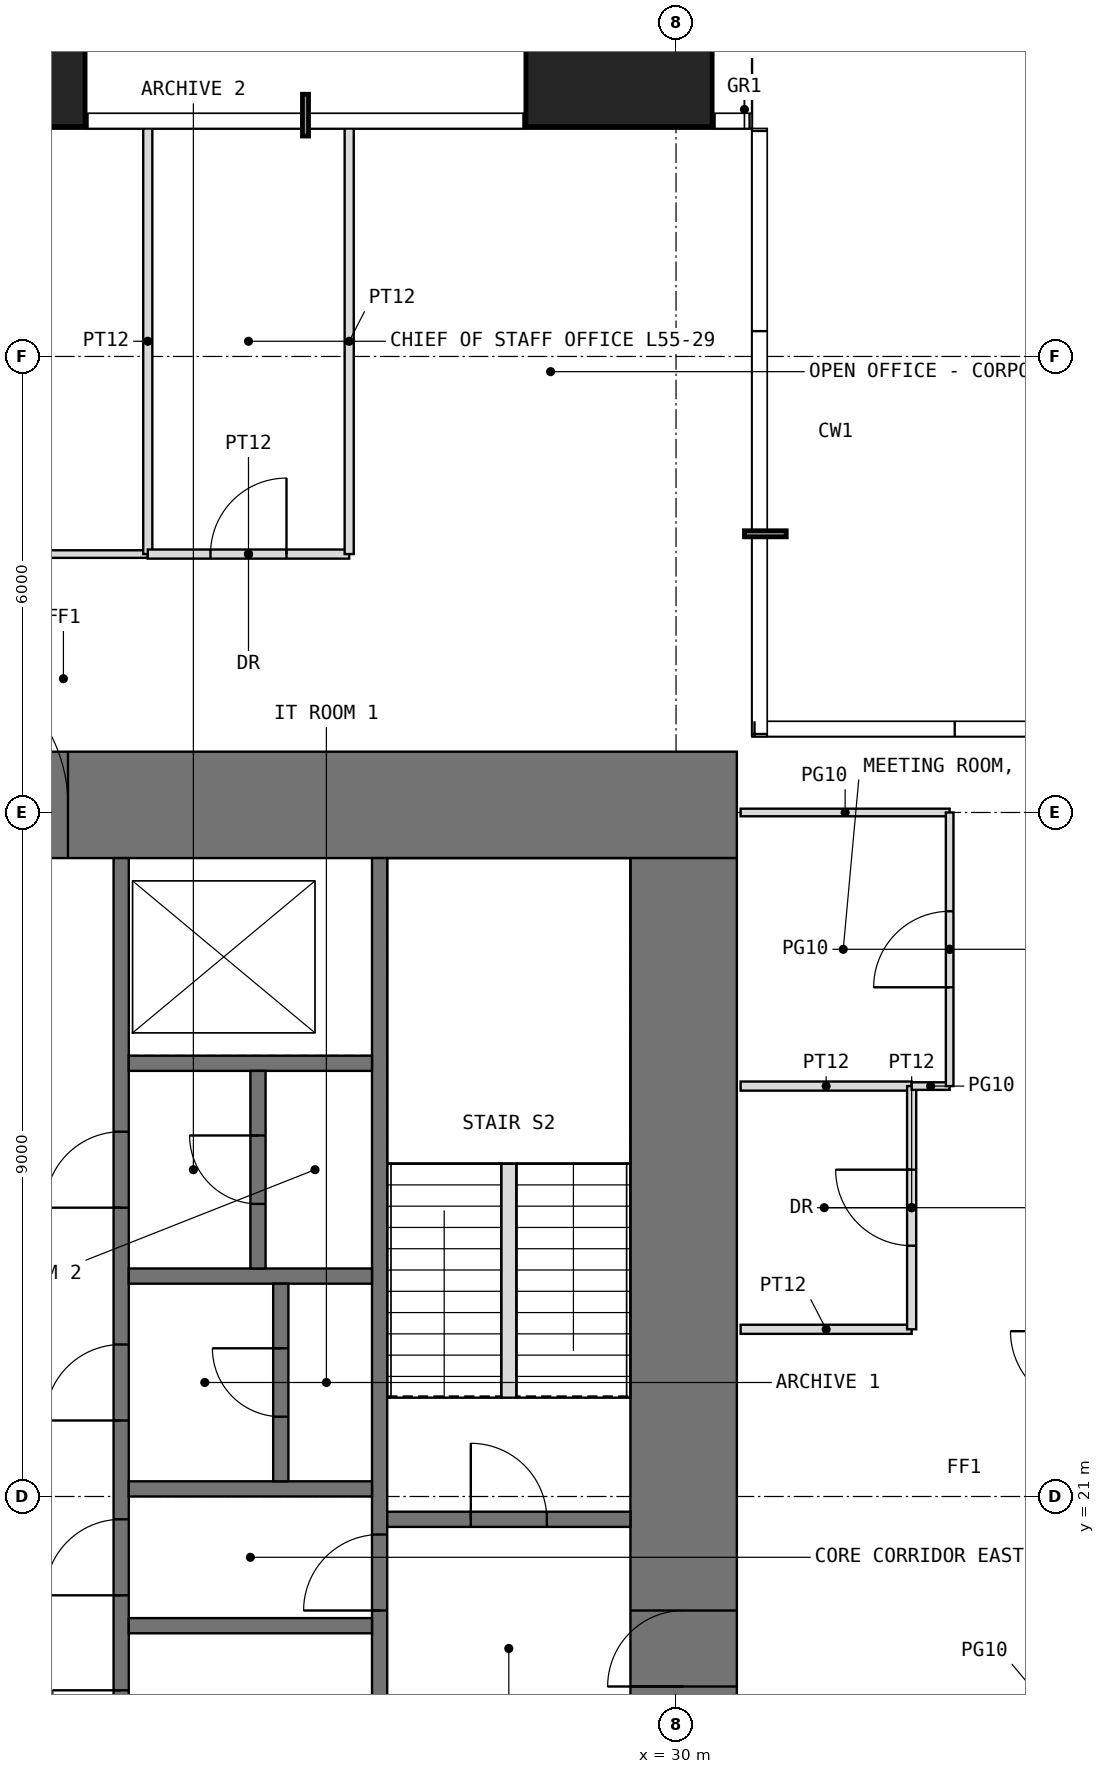
"""IFC4 building model, lengths in metres.
Left out: names, types, materials, properties, quantities, classifications, styles, units other than length and angle.
Written with IfcOpenShell. Run it as: python <this file> out.ifc"""

import sys

from ifc_helpers import new_model, si_unit, direction, frame, frame_2d, origin, origin_2d, place, context, subcontext, project, spatial, rectangle, extrude, element, fill, save


model = new_model("IFC4")
c1 = context("Model", 3, precision=1e-05, world=origin(), true_north=direction((0.0, 1.0)))
c2 = subcontext(c1, "Body", "Model", "MODEL_VIEW")
j1 = project(units=[si_unit("LENGTHUNIT", "METRE"), si_unit("PLANEANGLEUNIT", "RADIAN")], contexts=[c1])
p1 = place(None, origin())
s1 = spatial("IfcSite", under=j1, at=p1, CompositionType="ELEMENT")
p2 = place(p1, origin())
s2 = spatial("IfcBuilding", under=s1, at=p2, CompositionType="ELEMENT")
p3 = place(p2, frame((0.0, 0.0, 230.5)))
s3 = spatial("IfcBuildingStorey", under=s2, at=p3, CompositionType="ELEMENT", Elevation=230.5)
for number, where, z_axis, x_axis in (
    (1, (21.0, 40.25, 0.0), (0.0, 0.0, 1.0), (1.0, 0.0, 0.0)),
    (2, (29.25, 40.25, 0.0), (0.0, 0.0, 1.0), (1.0, 0.0, 0.0)),
):
    element("IfcColumn", number, at=place(p3, frame(where, z_axis=z_axis, x_axis=x_axis)), inside=s3, PredefinedType="COLUMN", context=c2, shape_type="SweptSolid", body=[
        extrude(rectangle(XDim=2.45, YDim=2.45, at=origin_2d()), origin(), (0.0, 0.0, 1.0), 4.0),
    ])
p4 = place(p3, frame((11.2, 30.1, -0.05), z_axis=(0.0, 0.0, 1.0), x_axis=(1.0, 0.0, 0.0)))
e3 = element("IfcWall", 3, at=p4, inside=s3, PredefinedType="SHEAR", context=c2, shape_type="SweptSolid", body=[
    extrude(rectangle(XDim=19.6, YDim=1.4, at=frame_2d((9.8, 0.0))), origin(), (0.0, 0.0, 1.0), 3.8),
])
p5 = place(p4, frame((8.8, 0.0, 0.05)))
e4 = element("IfcOpeningElement", 4, at=p5, cuts=e3, PredefinedType="OPENING", context=c2, shape_type="SweptSolid", body=[
    extrude(rectangle(XDim=2.0, YDim=2.2, at=frame_2d((1.0, 1.1))), frame((0.0, 0.71, 0.0), z_axis=(0.0, -1.0, 0.0), x_axis=(1.0, 0.0, 0.0)), (0.0, 0.0, 1.0), 1.42),
])
p6 = place(p3, frame((30.1, 12.6, -0.05), z_axis=(0.0, 0.0, 1.0), x_axis=(0.0, 1.0, 0.0)))
e5 = element("IfcWall", 5, at=p6, inside=s3, PredefinedType="SHEAR", context=c2, shape_type="SweptSolid", body=[
    extrude(rectangle(XDim=16.8, YDim=1.4, at=frame_2d((8.4, 0.0))), origin(), (0.0, 0.0, 1.0), 3.8),
])
p7 = place(p6, frame((5.9, 0.0, 0.05)))
e6 = element("IfcOpeningElement", 6, at=p7, cuts=e5, PredefinedType="OPENING", context=c2, shape_type="SweptSolid", body=[
    extrude(rectangle(XDim=1.0, YDim=2.2, at=frame_2d((0.5, 1.1))), frame((0.0, 0.71, 0.0), z_axis=(0.0, -1.0, 0.0), x_axis=(1.0, 0.0, 0.0)), (0.0, 0.0, 1.0), 1.42),
])
p8 = place(p3, frame((22.7, 12.6, -0.05), z_axis=(0.0, 0.0, 1.0), x_axis=(0.0, 1.0, 0.0)))
e7 = element("IfcWall", 7, at=p8, inside=s3, PredefinedType="SHEAR", context=c2, shape_type="SweptSolid", body=[
    extrude(rectangle(XDim=16.8, YDim=0.2, at=frame_2d((8.4, 0.0))), origin(), (0.0, 0.0, 1.0), 3.8),
])
p9 = place(p8, frame((3.05, 0.0, 0.05)))
e8 = element("IfcOpeningElement", 8, at=p9, cuts=e7, PredefinedType="OPENING", context=c2, shape_type="SweptSolid", body=[
    extrude(rectangle(XDim=0.9, YDim=2.2, at=frame_2d((0.45, 1.1))), frame((0.0, 0.11, 0.0), z_axis=(0.0, -1.0, 0.0), x_axis=(1.0, 0.0, 0.0)), (0.0, 0.0, 1.0), 0.22),
])
p10 = place(p8, frame((7.1, 0.0, 0.05)))
e9 = element("IfcOpeningElement", 9, at=p10, cuts=e7, PredefinedType="OPENING", context=c2, shape_type="SweptSolid", body=[
    extrude(rectangle(XDim=1.0, YDim=2.2, at=frame_2d((0.5, 1.1))), frame((0.0, 0.11, 0.0), z_axis=(0.0, -1.0, 0.0), x_axis=(1.0, 0.0, 0.0)), (0.0, 0.0, 1.0), 0.22),
])
p11 = place(p8, frame((1.55, 0.0, 0.05)))
e10 = element("IfcOpeningElement", 10, at=p11, cuts=e7, PredefinedType="OPENING", context=c2, shape_type="SweptSolid", body=[
    extrude(rectangle(XDim=0.9, YDim=2.2, at=frame_2d((0.45, 1.1))), frame((0.0, 0.11, 0.0), z_axis=(0.0, -1.0, 0.0), x_axis=(1.0, 0.0, 0.0)), (0.0, 0.0, 1.0), 0.22),
])
p12 = place(p8, frame((4.95, 0.0, 0.05)))
e11 = element("IfcOpeningElement", 11, at=p12, cuts=e7, PredefinedType="OPENING", context=c2, shape_type="SweptSolid", body=[
    extrude(rectangle(XDim=0.9, YDim=2.2, at=frame_2d((0.45, 1.1))), frame((0.0, 0.11, 0.0), z_axis=(0.0, -1.0, 0.0), x_axis=(1.0, 0.0, 0.0)), (0.0, 0.0, 1.0), 0.22),
])
p13 = place(p8, frame((9.4, 0.0, 0.05)))
e12 = element("IfcOpeningElement", 12, at=p13, cuts=e7, PredefinedType="OPENING", context=c2, shape_type="SweptSolid", body=[
    extrude(rectangle(XDim=1.0, YDim=2.2, at=frame_2d((0.5, 1.1))), frame((0.0, 0.11, 0.0), z_axis=(0.0, -1.0, 0.0), x_axis=(1.0, 0.0, 0.0)), (0.0, 0.0, 1.0), 0.22),
])
p14 = place(p8, frame((12.2, 0.0, 0.05)))
e13 = element("IfcOpeningElement", 13, at=p14, cuts=e7, PredefinedType="OPENING", context=c2, shape_type="SweptSolid", body=[
    extrude(rectangle(XDim=1.0, YDim=2.2, at=frame_2d((0.5, 1.1))), frame((0.0, 0.11, 0.0), z_axis=(0.0, -1.0, 0.0), x_axis=(1.0, 0.0, 0.0)), (0.0, 0.0, 1.0), 0.22),
])
p15 = place(p3, frame((26.1, 12.6, -0.05), z_axis=(0.0, 0.0, 1.0), x_axis=(0.0, 1.0, 0.0)))
e14 = element("IfcWall", 14, at=p15, inside=s3, PredefinedType="SHEAR", context=c2, shape_type="SweptSolid", body=[
    extrude(rectangle(XDim=16.8, YDim=0.2, at=frame_2d((8.4, 0.0))), origin(), (0.0, 0.0, 1.0), 3.8),
])
p16 = place(p15, frame((6.9, 0.0, 0.05)))
e15 = element("IfcOpeningElement", 15, at=p16, cuts=e14, PredefinedType="OPENING", context=c2, shape_type="SweptSolid", body=[
    extrude(rectangle(XDim=1.0, YDim=2.2, at=frame_2d((0.5, 1.1))), frame((0.0, 0.11, 0.0), z_axis=(0.0, -1.0, 0.0), x_axis=(1.0, 0.0, 0.0)), (0.0, 0.0, 1.0), 0.22),
])
for number, where, z_axis, x_axis in (
    (16, (22.8, 19.3, -0.05), (0.0, 0.0, 1.0), (1.0, 0.0, 0.0)),
    (17, (22.8, 21.1, -0.05), (0.0, 0.0, 1.0), (1.0, 0.0, 0.0)),
    (18, (22.8, 23.9, -0.05), (0.0, 0.0, 1.0), (1.0, 0.0, 0.0)),
    (19, (22.8, 26.7, -0.05), (0.0, 0.0, 1.0), (1.0, 0.0, 0.0)),
):
    element("IfcWall", number, at=place(p3, frame(where, z_axis=z_axis, x_axis=x_axis)), inside=s3, PredefinedType="SHEAR", context=c2, shape_type="SweptSolid", body=[
        extrude(rectangle(XDim=3.2, YDim=0.2, at=frame_2d((1.6, 0.0))), origin(), (0.0, 0.0, 1.0), 3.8),
    ])
p17 = place(p3, frame((26.2, 20.7, -0.05), z_axis=(0.0, 0.0, 1.0), x_axis=(1.0, 0.0, 0.0)))
e20 = element("IfcWall", 20, at=p17, inside=s3, PredefinedType="SHEAR", context=c2, shape_type="SweptSolid", body=[
    extrude(rectangle(XDim=3.2, YDim=0.2, at=frame_2d((1.6, 0.0))), origin(), (0.0, 0.0, 1.0), 3.8),
])
p18 = place(p17, frame((1.1, 0.0, 0.05)))
e21 = element("IfcOpeningElement", 21, at=p18, cuts=e20, PredefinedType="OPENING", context=c2, shape_type="SweptSolid", body=[
    extrude(rectangle(XDim=1.0, YDim=2.2, at=frame_2d((0.5, 1.1))), frame((0.0, 0.11, 0.0), z_axis=(0.0, -1.0, 0.0), x_axis=(1.0, 0.0, 0.0)), (0.0, 0.0, 1.0), 0.22),
])
p19 = place(p3, frame((24.8, 21.2, -0.05), z_axis=(0.0, 0.0, 1.0), x_axis=(0.0, 1.0, 0.0)))
e22 = element("IfcWall", 22, at=p19, inside=s3, PredefinedType="SHEAR", context=c2, shape_type="SweptSolid", body=[
    extrude(rectangle(XDim=2.6, YDim=0.2, at=frame_2d((1.3, 0.0))), origin(), (0.0, 0.0, 1.0), 3.8),
])
p20 = place(p19, frame((0.85, 0.0, 0.05)))
e23 = element("IfcOpeningElement", 23, at=p20, cuts=e22, PredefinedType="OPENING", context=c2, shape_type="SweptSolid", body=[
    extrude(rectangle(XDim=0.9, YDim=2.2, at=frame_2d((0.45, 1.1))), frame((0.0, 0.11, 0.0), z_axis=(0.0, -1.0, 0.0), x_axis=(1.0, 0.0, 0.0)), (0.0, 0.0, 1.0), 0.22),
])
p21 = place(p3, frame((24.5, 24.0, -0.05), z_axis=(0.0, 0.0, 1.0), x_axis=(0.0, 1.0, 0.0)))
e24 = element("IfcWall", 24, at=p21, inside=s3, PredefinedType="SHEAR", context=c2, shape_type="SweptSolid", body=[
    extrude(rectangle(XDim=2.6, YDim=0.2, at=frame_2d((1.3, 0.0))), origin(), (0.0, 0.0, 1.0), 3.8),
])
p22 = place(p21, frame((0.85, 0.0, 0.05)))
e25 = element("IfcOpeningElement", 25, at=p22, cuts=e24, PredefinedType="OPENING", context=c2, shape_type="SweptSolid", body=[
    extrude(rectangle(XDim=0.9, YDim=2.2, at=frame_2d((0.45, 1.1))), frame((0.0, 0.11, 0.0), z_axis=(0.0, -1.0, 0.0), x_axis=(1.0, 0.0, 0.0)), (0.0, 0.0, 1.0), 0.22),
])
p23 = place(p3, frame((13.8, 33.4, 0.0), z_axis=(0.0, 0.0, 1.0), x_axis=(1.0, 0.0, 0.0)))
e26 = element("IfcWall", 26, at=p23, inside=s3, PredefinedType="PARTITIONING", context=c2, shape_type="SweptSolid", body=[
    extrude(rectangle(XDim=9.25, YDim=0.1, at=frame_2d((4.625, 0.0))), origin(), (0.0, 0.0, 1.0), 3.55),
])
p24 = place(p23, frame((4.125, 0.0, 0.0)))
e27 = element("IfcOpeningElement", 27, at=p24, cuts=e26, PredefinedType="OPENING", context=c2, shape_type="SweptSolid", body=[
    extrude(rectangle(XDim=1.0, YDim=2.4, at=frame_2d((0.5, 1.2))), frame((0.0, 0.06, 0.0), z_axis=(0.0, -1.0, 0.0), x_axis=(1.0, 0.0, 0.0)), (0.0, 0.0, 1.0), 0.12),
])
p25 = place(p3, frame((23.05, 33.4, 0.0), z_axis=(0.0, 0.0, 1.0), x_axis=(0.0, 1.0, 0.0)))
e28 = element("IfcWall", 28, at=p25, inside=s3, PredefinedType="PARTITIONING", context=c2, shape_type="SweptSolid", body=[
    extrude(rectangle(XDim=5.6, YDim=0.12, at=frame_2d((2.8, 0.0))), origin(), (0.0, 0.0, 1.0), 3.55),
])
p26 = place(p3, frame((23.05, 33.4, 0.0), z_axis=(0.0, 0.0, 1.0), x_axis=(1.0, 0.0, 0.0)))
e29 = element("IfcWall", 29, at=p26, inside=s3, PredefinedType="PARTITIONING", context=c2, shape_type="SweptSolid", body=[
    extrude(rectangle(XDim=2.65, YDim=0.12, at=frame_2d((1.325, 0.0))), origin(), (0.0, 0.0, 1.0), 3.55),
])
p27 = place(p26, frame((0.825, 0.0, 0.0)))
e30 = element("IfcOpeningElement", 30, at=p27, cuts=e29, PredefinedType="OPENING", context=c2, shape_type="SweptSolid", body=[
    extrude(rectangle(XDim=1.0, YDim=2.2, at=frame_2d((0.5, 1.1))), frame((0.0, 0.07, 0.0), z_axis=(0.0, -1.0, 0.0), x_axis=(1.0, 0.0, 0.0)), (0.0, 0.0, 1.0), 0.14),
])
p28 = place(p3, frame((25.7, 33.4, 0.0), z_axis=(0.0, 0.0, 1.0), x_axis=(0.0, 1.0, 0.0)))
e31 = element("IfcWall", 31, at=p28, inside=s3, PredefinedType="PARTITIONING", context=c2, shape_type="SweptSolid", body=[
    extrude(rectangle(XDim=5.6, YDim=0.12, at=frame_2d((2.8, 0.0))), origin(), (0.0, 0.0, 1.0), 3.55),
])
for number, where, z_axis, x_axis in (
    (32, (30.85, 23.2, 0.0), (0.0, 0.0, 1.0), (1.0, 0.0, 0.0)),
    (33, (30.85, 26.4, 0.0), (0.0, 0.0, 1.0), (1.0, 0.0, 0.0)),
):
    element("IfcWall", number, at=place(p3, frame(where, z_axis=z_axis, x_axis=x_axis)), inside=s3, PredefinedType="PARTITIONING", context=c2, shape_type="SweptSolid", body=[
        extrude(rectangle(XDim=2.25, YDim=0.12, at=frame_2d((1.125, 0.0))), origin(), (0.0, 0.0, 1.0), 3.55),
    ])
p29 = place(p3, frame((30.85, 30.0, 0.0), z_axis=(0.0, 0.0, 1.0), x_axis=(1.0, 0.0, 0.0)))
e34 = element("IfcWall", 34, at=p29, inside=s3, PredefinedType="PARTITIONING", context=c2, shape_type="SweptSolid", body=[
    extrude(rectangle(XDim=2.75, YDim=0.1, at=frame_2d((1.375, 0.0))), origin(), (0.0, 0.0, 1.0), 3.55),
])
p30 = place(p3, frame((33.1, 23.2, 0.0), z_axis=(0.0, 0.0, 1.0), x_axis=(0.0, 1.0, 0.0)))
e35 = element("IfcWall", 35, at=p30, inside=s3, PredefinedType="PARTITIONING", context=c2, shape_type="SweptSolid", body=[
    extrude(rectangle(XDim=3.2, YDim=0.12, at=frame_2d((1.6, 0.0))), origin(), (0.0, 0.0, 1.0), 3.55),
])
p31 = place(p30, frame((1.1, 0.0, 0.0)))
e36 = element("IfcOpeningElement", 36, at=p31, cuts=e35, PredefinedType="OPENING", context=c2, shape_type="SweptSolid", body=[
    extrude(rectangle(XDim=1.0, YDim=2.2, at=frame_2d((0.5, 1.1))), frame((0.0, 0.07, 0.0), z_axis=(0.0, -1.0, 0.0), x_axis=(1.0, 0.0, 0.0)), (0.0, 0.0, 1.0), 0.14),
])
p32 = place(p3, frame((33.1, 26.4, 0.0), z_axis=(0.0, 0.0, 1.0), x_axis=(1.0, 0.0, 0.0)))
e37 = element("IfcWall", 37, at=p32, inside=s3, PredefinedType="PARTITIONING", context=c2, shape_type="SweptSolid", body=[
    extrude(rectangle(XDim=0.5, YDim=0.1, at=frame_2d((0.25, 0.0))), origin(), (0.0, 0.0, 1.0), 3.55),
])
p33 = place(p3, frame((33.6, 26.4, 0.0), z_axis=(0.0, 0.0, 1.0), x_axis=(0.0, 1.0, 0.0)))
e38 = element("IfcWall", 38, at=p33, inside=s3, PredefinedType="PARTITIONING", context=c2, shape_type="SweptSolid", body=[
    extrude(rectangle(XDim=3.6, YDim=0.1, at=frame_2d((1.8, 0.0))), origin(), (0.0, 0.0, 1.0), 3.55),
])
p34 = place(p33, frame((1.3, 0.0, 0.0)))
e39 = element("IfcOpeningElement", 39, at=p34, cuts=e38, PredefinedType="OPENING", context=c2, shape_type="SweptSolid", body=[
    extrude(rectangle(XDim=1.0, YDim=2.4, at=frame_2d((0.5, 1.2))), frame((0.0, 0.06, 0.0), z_axis=(0.0, -1.0, 0.0), x_axis=(1.0, 0.0, 0.0)), (0.0, 0.0, 1.0), 0.12),
])
p35 = place(p3, frame((27.8, 22.3, 0.0), z_axis=(0.0, 0.0, 1.0), x_axis=(0.0, 1.0, 0.0)))
e40 = element("IfcWall", 40, at=p35, inside=s3, PredefinedType="PARTITIONING", context=c2, shape_type="SweptSolid", body=[
    extrude(rectangle(XDim=3.08, YDim=0.2, at=frame_2d((1.54, 0.0))), origin(), (0.0, 0.0, 1.0), 4.0),
])
p36 = place(p5, origin())
e41 = element("IfcDoor", 41, at=p36, inside=s3, OperationType="DOUBLE_DOOR_SINGLE_SWING", PredefinedType="DOOR", context=c2, shape_type="SweptSolid", body=[
    extrude(rectangle(XDim=2.0, YDim=2.2, at=frame_2d((1.0, 1.1))), frame((0.0, 0.025, 0.0), z_axis=(0.0, -1.0, 0.0), x_axis=(1.0, 0.0, 0.0)), (0.0, 0.0, 1.0), 0.05),
])
fill(e4, e41)
p37 = place(p7, origin())
e42 = element("IfcDoor", 42, at=p37, inside=s3, OperationType="SINGLE_SWING_LEFT", PredefinedType="DOOR", context=c2, shape_type="SweptSolid", body=[
    extrude(rectangle(XDim=1.0, YDim=2.2, at=frame_2d((0.5, 1.1))), frame((0.0, 0.025, 0.0), z_axis=(0.0, -1.0, 0.0), x_axis=(1.0, 0.0, 0.0)), (0.0, 0.0, 1.0), 0.05),
])
fill(e6, e42)
p38 = place(p18, origin())
e43 = element("IfcDoor", 43, at=p38, inside=s3, OperationType="SINGLE_SWING_LEFT", PredefinedType="DOOR", context=c2, shape_type="SweptSolid", body=[
    extrude(rectangle(XDim=1.0, YDim=2.2, at=frame_2d((0.5, 1.1))), frame((0.0, 0.025, 0.0), z_axis=(0.0, -1.0, 0.0), x_axis=(1.0, 0.0, 0.0)), (0.0, 0.0, 1.0), 0.05),
])
fill(e21, e43)
p39 = place(p16, origin())
e44 = element("IfcDoor", 44, at=p39, inside=s3, OperationType="SINGLE_SWING_LEFT", PredefinedType="DOOR", context=c2, shape_type="SweptSolid", body=[
    extrude(rectangle(XDim=1.0, YDim=2.2, at=frame_2d((0.5, 1.1))), frame((0.0, 0.025, 0.0), z_axis=(0.0, -1.0, 0.0), x_axis=(1.0, 0.0, 0.0)), (0.0, 0.0, 1.0), 0.05),
])
fill(e15, e44)
p40 = place(p10, origin())
e45 = element("IfcDoor", 45, at=p40, inside=s3, OperationType="SINGLE_SWING_LEFT", PredefinedType="DOOR", context=c2, shape_type="SweptSolid", body=[
    extrude(rectangle(XDim=1.0, YDim=2.2, at=frame_2d((0.5, 1.1))), frame((0.0, 0.025, 0.0), z_axis=(0.0, -1.0, 0.0), x_axis=(1.0, 0.0, 0.0)), (0.0, 0.0, 1.0), 0.05),
])
fill(e9, e45)
p41 = place(p12, origin())
e46 = element("IfcDoor", 46, at=p41, inside=s3, OperationType="SINGLE_SWING_RIGHT", PredefinedType="DOOR", context=c2, shape_type="SweptSolid", body=[
    extrude(rectangle(XDim=0.9, YDim=2.2, at=frame_2d((0.45, 1.1))), frame((0.0, 0.025, 0.0), z_axis=(0.0, -1.0, 0.0), x_axis=(1.0, 0.0, 0.0)), (0.0, 0.0, 1.0), 0.05),
])
fill(e11, e46)
p42 = place(p13, origin())
e47 = element("IfcDoor", 47, at=p42, inside=s3, OperationType="SINGLE_SWING_LEFT", PredefinedType="DOOR", context=c2, shape_type="SweptSolid", body=[
    extrude(rectangle(XDim=1.0, YDim=2.2, at=frame_2d((0.5, 1.1))), frame((0.0, 0.025, 0.0), z_axis=(0.0, -1.0, 0.0), x_axis=(1.0, 0.0, 0.0)), (0.0, 0.0, 1.0), 0.05),
])
fill(e12, e47)
p43 = place(p20, origin())
e48 = element("IfcDoor", 48, at=p43, inside=s3, OperationType="SINGLE_SWING_RIGHT", PredefinedType="DOOR", context=c2, shape_type="SweptSolid", body=[
    extrude(rectangle(XDim=0.9, YDim=2.2, at=frame_2d((0.45, 1.1))), frame((0.0, 0.025, 0.0), z_axis=(0.0, -1.0, 0.0), x_axis=(1.0, 0.0, 0.0)), (0.0, 0.0, 1.0), 0.05),
])
fill(e23, e48)
p44 = place(p14, origin())
e49 = element("IfcDoor", 49, at=p44, inside=s3, OperationType="SINGLE_SWING_LEFT", PredefinedType="DOOR", context=c2, shape_type="SweptSolid", body=[
    extrude(rectangle(XDim=1.0, YDim=2.2, at=frame_2d((0.5, 1.1))), frame((0.0, 0.025, 0.0), z_axis=(0.0, -1.0, 0.0), x_axis=(1.0, 0.0, 0.0)), (0.0, 0.0, 1.0), 0.05),
])
fill(e13, e49)
p45 = place(p22, origin())
e50 = element("IfcDoor", 50, at=p45, inside=s3, OperationType="SINGLE_SWING_RIGHT", PredefinedType="DOOR", context=c2, shape_type="SweptSolid", body=[
    extrude(rectangle(XDim=0.9, YDim=2.2, at=frame_2d((0.45, 1.1))), frame((0.0, 0.025, 0.0), z_axis=(0.0, -1.0, 0.0), x_axis=(1.0, 0.0, 0.0)), (0.0, 0.0, 1.0), 0.05),
])
fill(e25, e50)
p46 = place(p31, origin())
e51 = element("IfcDoor", 51, at=p46, inside=s3, OperationType="SINGLE_SWING_RIGHT", PredefinedType="DOOR", context=c2, shape_type="SweptSolid", body=[
    extrude(rectangle(XDim=1.0, YDim=2.2, at=frame_2d((0.5, 1.1))), frame((0.0, 0.025, 0.0), z_axis=(0.0, -1.0, 0.0), x_axis=(1.0, 0.0, 0.0)), (0.0, 0.0, 1.0), 0.05),
])
fill(e36, e51)
p47 = place(p34, origin())
e52 = element("IfcDoor", 52, at=p47, inside=s3, OperationType="SINGLE_SWING_LEFT", PredefinedType="DOOR", context=c2, shape_type="SweptSolid", body=[
    extrude(rectangle(XDim=1.0, YDim=2.4, at=frame_2d((0.5, 1.2))), frame((0.0, 0.025, 0.0), z_axis=(0.0, -1.0, 0.0), x_axis=(1.0, 0.0, 0.0)), (0.0, 0.0, 1.0), 0.05),
])
fill(e39, e52)
p48 = place(p27, origin())
e53 = element("IfcDoor", 53, at=p48, inside=s3, OperationType="SINGLE_SWING_RIGHT", PredefinedType="DOOR", context=c2, shape_type="SweptSolid", body=[
    extrude(rectangle(XDim=1.0, YDim=2.2, at=frame_2d((0.5, 1.1))), frame((0.0, 0.025, 0.0), z_axis=(0.0, -1.0, 0.0), x_axis=(1.0, 0.0, 0.0)), (0.0, 0.0, 1.0), 0.05),
])
fill(e30, e53)
save(model, sys.argv[1])
